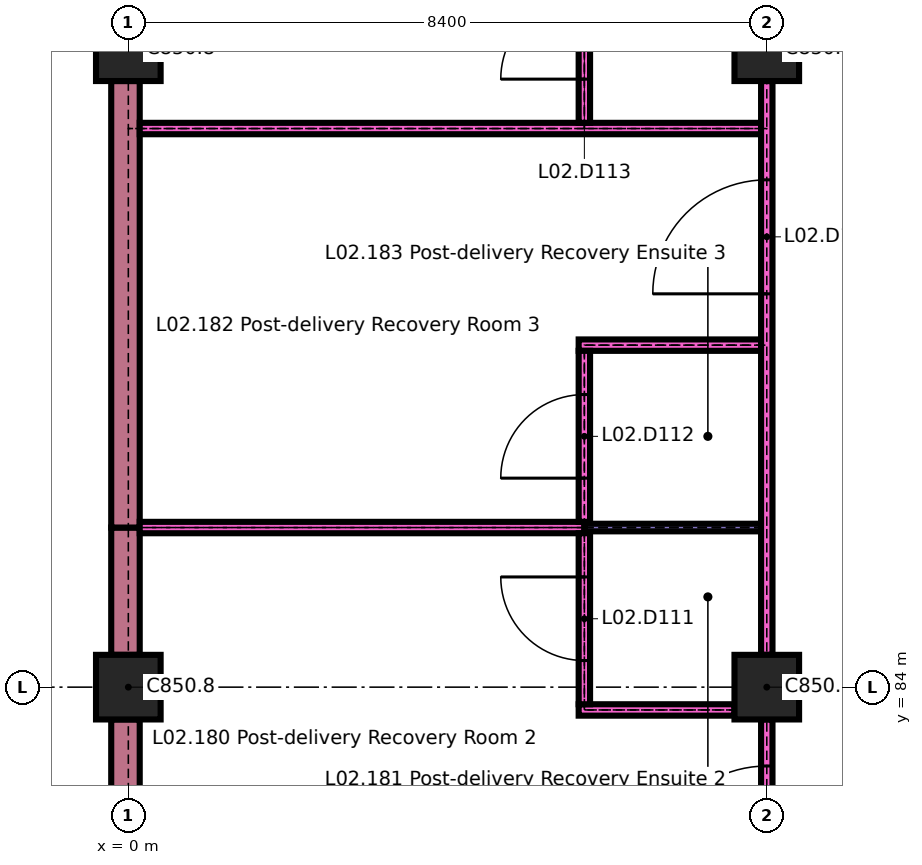
"""IFC4 building model, lengths in metres.
Left out: names, types, materials, properties, quantities, classifications, styles, units other than length and angle.
Written with IfcOpenShell. Run it as: python <this file> out.ifc"""

import sys

from ifc_helpers import new_model, si_unit, direction, frame, frame_2d, origin, origin_2d, place, context, subcontext, project, spatial, rectangle, extrude, element, fill, save


model = new_model("IFC4")
c1 = context("Model", 3, precision=1e-05, world=origin(), true_north=direction((0.0, 1.0)))
c2 = subcontext(c1, "Body", "Model", "MODEL_VIEW")
j1 = project(units=[si_unit("LENGTHUNIT", "METRE"), si_unit("PLANEANGLEUNIT", "RADIAN")], contexts=[c1])
p1 = place(None, origin())
s1 = spatial("IfcSite", under=j1, at=p1, CompositionType="ELEMENT")
p2 = place(p1, origin())
s2 = spatial("IfcBuilding", under=s1, at=p2, CompositionType="ELEMENT")
p3 = place(p2, frame((0.0, 0.0, 8.4)))
s3 = spatial("IfcBuildingStorey", under=s2, at=p3, CompositionType="ELEMENT", Elevation=8.4)
for number, where, z_axis, x_axis in (
    (1, (0.0, 84.0, 0.0), (0.0, 0.0, 1.0), (1.0, 0.0, 0.0)),
    (2, (8.4, 84.0, 0.0), (0.0, 0.0, 1.0), (1.0, 0.0, 0.0)),
    (3, (0.0, 92.4, 0.0), (0.0, 0.0, 1.0), (1.0, 0.0, 0.0)),
    (4, (8.4, 92.4, 0.0), (0.0, 0.0, 1.0), (1.0, 0.0, 0.0)),
):
    element("IfcColumn", number, at=place(p3, frame(where, z_axis=z_axis, x_axis=x_axis)), inside=s3, PredefinedType="COLUMN", context=c2, shape_type="SweptSolid", body=[
        extrude(rectangle(XDim=0.85, YDim=0.85, at=origin_2d()), origin(), (0.0, 0.0, 1.0), 4.2),
    ])
p4 = place(p3, frame((-0.038, 80.85, 0.0), z_axis=(0.0, 0.0, 1.0), x_axis=(0.0, 1.0, 0.0)))
e5 = element("IfcWall", 5, at=p4, inside=s3, PredefinedType="SOLIDWALL", context=c2, shape_type="SweptSolid", body=[
    extrude(rectangle(XDim=2.725, YDim=0.375, at=frame_2d((1.362, 0.0))), origin(), (0.0, 0.0, 1.0), 3.9),
])
p5 = place(p3, frame((-0.038, 84.425, 0.0), z_axis=(0.0, 0.0, 1.0), x_axis=(0.0, 1.0, 0.0)))
e6 = element("IfcWall", 6, at=p5, inside=s3, PredefinedType="SOLIDWALL", context=c2, shape_type="SweptSolid", body=[
    extrude(rectangle(XDim=1.675, YDim=0.375, at=frame_2d((0.837, 0.0))), origin(), (0.0, 0.0, 1.0), 3.9),
])
p6 = place(p3, frame((-0.038, 86.1, 0.0), z_axis=(0.0, 0.0, 1.0), x_axis=(0.0, 1.0, 0.0)))
e7 = element("IfcWall", 7, at=p6, inside=s3, PredefinedType="SOLIDWALL", context=c2, shape_type="SweptSolid", body=[
    extrude(rectangle(XDim=5.875, YDim=0.375, at=frame_2d((2.938, 0.0))), origin(), (0.0, 0.0, 1.0), 3.9),
])
p7 = place(p3, frame((5.925, 83.7, 0.0), z_axis=(0.0, 0.0, 1.0), x_axis=(1.0, 0.0, 0.0)))
e8 = element("IfcWall", 8, at=p7, inside=s3, PredefinedType="PARTITIONING", context=c2, shape_type="SweptSolid", body=[
    extrude(rectangle(XDim=2.05, YDim=0.15, at=frame_2d((1.025, 0.0))), origin(), (0.0, 0.0, 1.0), 4.2),
])
p8 = place(p3, frame((0.15, 86.1, 0.0), z_axis=(0.0, 0.0, 1.0), x_axis=(1.0, 0.0, 0.0)))
e9 = element("IfcWall", 9, at=p8, inside=s3, PredefinedType="PARTITIONING", context=c2, shape_type="SweptSolid", body=[
    extrude(rectangle(XDim=5.85, YDim=0.15, at=frame_2d((2.925, 0.0))), origin(), (0.0, 0.0, 1.0), 4.2),
])
p9 = place(p3, frame((6.0, 86.1, 0.0), z_axis=(0.0, 0.0, 1.0), x_axis=(1.0, 0.0, 0.0)))
e10 = element("IfcWall", 10, at=p9, inside=s3, PredefinedType="PARTITIONING", context=c2, shape_type="SweptSolid", body=[
    extrude(rectangle(XDim=2.325, YDim=0.1, at=frame_2d((1.163, 0.0))), origin(), (0.0, 0.0, 1.0), 4.2),
])
p10 = place(p3, frame((5.925, 88.5, 0.0), z_axis=(0.0, 0.0, 1.0), x_axis=(1.0, 0.0, 0.0)))
e11 = element("IfcWall", 11, at=p10, inside=s3, PredefinedType="PARTITIONING", context=c2, shape_type="SweptSolid", body=[
    extrude(rectangle(XDim=2.4, YDim=0.15, at=frame_2d((1.2, 0.0))), origin(), (0.0, 0.0, 1.0), 4.2),
])
p11 = place(p3, frame((0.15, 91.35, 0.0), z_axis=(0.0, 0.0, 1.0), x_axis=(1.0, 0.0, 0.0)))
e12 = element("IfcWall", 12, at=p11, inside=s3, PredefinedType="PARTITIONING", context=c2, shape_type="SweptSolid", body=[
    extrude(rectangle(XDim=8.175, YDim=0.15, at=frame_2d((4.087, 0.0))), origin(), (0.0, 0.0, 1.0), 4.2),
])
p12 = place(p3, frame((6.0, 83.775, 0.0), z_axis=(0.0, 0.0, 1.0), x_axis=(0.0, 1.0, 0.0)))
e13 = element("IfcWall", 13, at=p12, inside=s3, PredefinedType="PARTITIONING", context=c2, shape_type="SweptSolid", body=[
    extrude(rectangle(XDim=2.25, YDim=0.15, at=frame_2d((1.125, 0.0))), origin(), (0.0, 0.0, 1.0), 4.2),
])
p13 = place(p12, frame((0.575, 0.0, 0.0)))
e14 = element("IfcOpeningElement", 14, at=p13, cuts=e13, PredefinedType="OPENING", context=c2, shape_type="SweptSolid", body=[
    extrude(rectangle(XDim=1.1, YDim=2.1, at=frame_2d((0.55, 1.05))), frame((0.0, 0.085, 0.0), z_axis=(0.0, -1.0, 0.0), x_axis=(1.0, 0.0, 0.0)), (0.0, 0.0, 1.0), 0.17),
])
p14 = place(p3, frame((6.0, 86.175, 0.0), z_axis=(0.0, 0.0, 1.0), x_axis=(0.0, 1.0, 0.0)))
e15 = element("IfcWall", 15, at=p14, inside=s3, PredefinedType="PARTITIONING", context=c2, shape_type="SweptSolid", body=[
    extrude(rectangle(XDim=2.25, YDim=0.15, at=frame_2d((1.125, 0.0))), origin(), (0.0, 0.0, 1.0), 4.2),
])
p15 = place(p14, frame((0.575, 0.0, 0.0)))
e16 = element("IfcOpeningElement", 16, at=p15, cuts=e15, PredefinedType="OPENING", context=c2, shape_type="SweptSolid", body=[
    extrude(rectangle(XDim=1.1, YDim=2.1, at=frame_2d((0.55, 1.05))), frame((0.0, 0.085, 0.0), z_axis=(0.0, -1.0, 0.0), x_axis=(1.0, 0.0, 0.0)), (0.0, 0.0, 1.0), 0.17),
])
p16 = place(p3, frame((6.0, 91.425, 0.0), z_axis=(0.0, 0.0, 1.0), x_axis=(0.0, 1.0, 0.0)))
e17 = element("IfcWall", 17, at=p16, inside=s3, PredefinedType="PARTITIONING", context=c2, shape_type="SweptSolid", body=[
    extrude(rectangle(XDim=2.25, YDim=0.15, at=frame_2d((1.125, 0.0))), origin(), (0.0, 0.0, 1.0), 4.2),
])
p17 = place(p16, frame((0.575, 0.0, 0.0)))
e18 = element("IfcOpeningElement", 18, at=p17, cuts=e17, PredefinedType="OPENING", context=c2, shape_type="SweptSolid", body=[
    extrude(rectangle(XDim=1.1, YDim=2.1, at=frame_2d((0.55, 1.05))), frame((0.0, 0.085, 0.0), z_axis=(0.0, -1.0, 0.0), x_axis=(1.0, 0.0, 0.0)), (0.0, 0.0, 1.0), 0.17),
])
p18 = place(p3, frame((8.4, 75.675, 0.0), z_axis=(0.0, 0.0, 1.0), x_axis=(0.0, 1.0, 0.0)))
e19 = element("IfcWall", 19, at=p18, inside=s3, PredefinedType="PARTITIONING", context=c2, shape_type="SweptSolid", body=[
    extrude(rectangle(XDim=7.9, YDim=0.15, at=frame_2d((3.95, 0.0))), origin(), (0.0, 0.0, 1.0), 4.2),
])
p19 = place(p18, frame((3.0, 0.0, 0.0)))
e20 = element("IfcOpeningElement", 20, at=p19, cuts=e19, PredefinedType="OPENING", context=c2, shape_type="SweptSolid", body=[
    extrude(rectangle(XDim=1.5, YDim=2.4, at=frame_2d((0.75, 1.2))), frame((0.0, 0.085, 0.0), z_axis=(0.0, -1.0, 0.0), x_axis=(1.0, 0.0, 0.0)), (0.0, 0.0, 1.0), 0.17),
])
p20 = place(p18, frame((5.788, 0.0, 0.0)))
e21 = element("IfcOpeningElement", 21, at=p20, cuts=e19, PredefinedType="OPENING", context=c2, shape_type="SweptSolid", body=[
    extrude(rectangle(XDim=1.5, YDim=2.4, at=frame_2d((0.75, 1.2))), frame((0.0, 0.085, 0.0), z_axis=(0.0, -1.0, 0.0), x_axis=(1.0, 0.0, 0.0)), (0.0, 0.0, 1.0), 0.17),
])
p21 = place(p3, frame((8.4, 84.425, 0.0), z_axis=(0.0, 0.0, 1.0), x_axis=(0.0, 1.0, 0.0)))
e22 = element("IfcWall", 22, at=p21, inside=s3, PredefinedType="PARTITIONING", context=c2, shape_type="SweptSolid", body=[
    extrude(rectangle(XDim=7.55, YDim=0.15, at=frame_2d((3.775, 0.0))), origin(), (0.0, 0.0, 1.0), 4.2),
])
p22 = place(p21, frame((4.75, 0.0, 0.0)))
e23 = element("IfcOpeningElement", 23, at=p22, cuts=e22, PredefinedType="OPENING", context=c2, shape_type="SweptSolid", body=[
    extrude(rectangle(XDim=1.5, YDim=2.4, at=frame_2d((0.75, 1.2))), frame((0.0, 0.085, 0.0), z_axis=(0.0, -1.0, 0.0), x_axis=(1.0, 0.0, 0.0)), (0.0, 0.0, 1.0), 0.17),
])
p23 = place(p13, origin())
e24 = element("IfcDoor", 24, at=p23, inside=s3, OperationType="SINGLE_SWING_LEFT", PredefinedType="DOOR", context=c2, shape_type="SweptSolid", body=[
    extrude(rectangle(XDim=1.1, YDim=2.1, at=frame_2d((0.55, 1.05))), frame((0.0, 0.025, 0.0), z_axis=(0.0, -1.0, 0.0), x_axis=(1.0, 0.0, 0.0)), (0.0, 0.0, 1.0), 0.05),
])
fill(e14, e24)
p24 = place(p15, origin())
e25 = element("IfcDoor", 25, at=p24, inside=s3, OperationType="SINGLE_SWING_RIGHT", PredefinedType="DOOR", context=c2, shape_type="SweptSolid", body=[
    extrude(rectangle(XDim=1.1, YDim=2.1, at=frame_2d((0.55, 1.05))), frame((0.0, 0.025, 0.0), z_axis=(0.0, -1.0, 0.0), x_axis=(1.0, 0.0, 0.0)), (0.0, 0.0, 1.0), 0.05),
])
fill(e16, e25)
p25 = place(p17, origin())
e26 = element("IfcDoor", 26, at=p25, inside=s3, OperationType="SINGLE_SWING_RIGHT", PredefinedType="DOOR", context=c2, shape_type="SweptSolid", body=[
    extrude(rectangle(XDim=1.1, YDim=2.1, at=frame_2d((0.55, 1.05))), frame((0.0, 0.025, 0.0), z_axis=(0.0, -1.0, 0.0), x_axis=(1.0, 0.0, 0.0)), (0.0, 0.0, 1.0), 0.05),
])
fill(e18, e26)
p26 = place(p20, origin())
e27 = element("IfcDoor", 27, at=p26, inside=s3, OperationType="SINGLE_SWING_RIGHT", PredefinedType="DOOR", context=c2, shape_type="SweptSolid", body=[
    extrude(rectangle(XDim=1.5, YDim=2.4, at=frame_2d((0.75, 1.2))), frame((0.0, 0.03, 0.0), z_axis=(0.0, -1.0, 0.0), x_axis=(1.0, 0.0, 0.0)), (0.0, 0.0, 1.0), 0.06),
])
fill(e21, e27)
p27 = place(p22, origin())
e28 = element("IfcDoor", 28, at=p27, inside=s3, OperationType="SINGLE_SWING_RIGHT", PredefinedType="DOOR", context=c2, shape_type="SweptSolid", body=[
    extrude(rectangle(XDim=1.5, YDim=2.4, at=frame_2d((0.75, 1.2))), frame((0.0, 0.03, 0.0), z_axis=(0.0, -1.0, 0.0), x_axis=(1.0, 0.0, 0.0)), (0.0, 0.0, 1.0), 0.06),
])
fill(e23, e28)
save(model, sys.argv[1])
